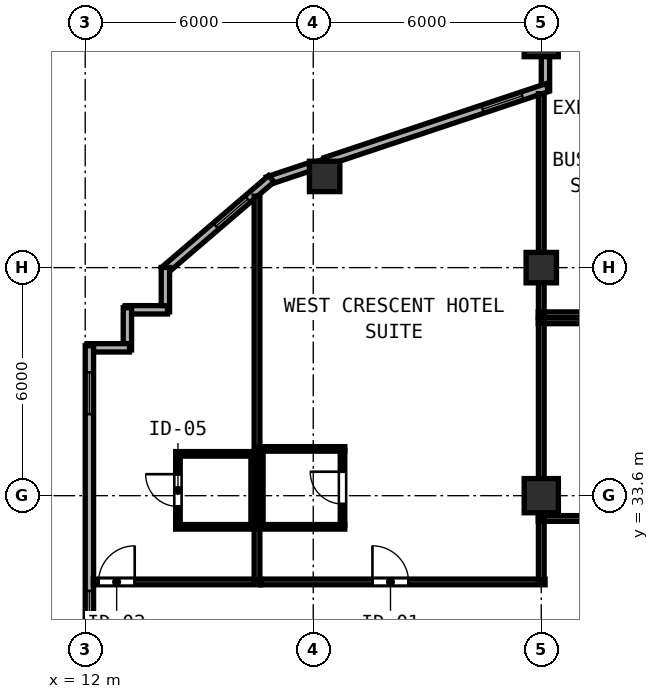
"""IFC4 building model, lengths in metres.
Left out: names, types, materials, properties, quantities, classifications, styles, units other than length and angle.
Written with IfcOpenShell. Run it as: python <this file> out.ifc"""

import sys

from ifc_helpers import new_model, si_unit, direction, frame, frame_2d, origin, origin_2d, place, context, subcontext, project, spatial, rectangle, hollow_rectangle, extrude, element, fill, save


model = new_model("IFC4")
c1 = context("Model", 3, precision=1e-05, world=origin(), true_north=direction((0.0, 1.0)))
c2 = subcontext(c1, "Body", "Model", "MODEL_VIEW")
j1 = project(units=[si_unit("LENGTHUNIT", "METRE"), si_unit("PLANEANGLEUNIT", "RADIAN")], contexts=[c1])
p1 = place(None, origin())
s1 = spatial("IfcSite", under=j1, at=p1, CompositionType="ELEMENT")
p2 = place(p1, origin())
s2 = spatial("IfcBuilding", under=s1, at=p2, CompositionType="ELEMENT")
p3 = place(p2, frame((0.0, 0.0, 199.4)))
s3 = spatial("IfcBuildingStorey", under=s2, at=p3, CompositionType="ELEMENT", Elevation=199.4)
for number, where, z_axis, x_axis in (
    (1, (24.0, 33.6, 0.0), (0.0, 0.0, 1.0), (1.0, 0.0, 0.0)),
    (2, (24.0, 45.6, 0.0), (0.0, 0.0, 1.0), (1.0, 0.0, 0.0)),
):
    element("IfcColumn", number, at=place(p3, frame(where, z_axis=z_axis, x_axis=x_axis)), inside=s3, PredefinedType="COLUMN", context=c2, shape_type="SweptSolid", body=[
        extrude(hollow_rectangle(XDim=0.9, YDim=0.9, WallThickness=0.034, at=origin_2d()), origin(), (0.0, 0.0, 1.0), 3.8),
    ])
for number, where, z_axis, x_axis in (
    (3, (24.0, 39.6, 0.0), (0.0, 0.0, 1.0), (1.0, 0.0, 0.0)),
    (4, (18.3, 42.0, 0.0), (0.0, 0.0, 1.0), (1.0, 0.0, 0.0)),
):
    element("IfcColumn", number, at=place(p3, frame(where, z_axis=z_axis, x_axis=x_axis)), inside=s3, PredefinedType="COLUMN", context=c2, shape_type="SweptSolid", body=[
        extrude(hollow_rectangle(XDim=0.8, YDim=0.8, WallThickness=0.03, at=origin_2d()), origin(), (0.0, 0.0, 1.0), 3.8),
    ])
p4 = place(p3, frame((24.11, 45.158, 0.0), z_axis=(0.0, 0.0, 1.0), x_axis=(0.0, -1.0, 0.0)))
e5 = element("IfcWall", 5, at=p4, inside=s3, PredefinedType="SOLIDWALL", context=c2, shape_type="SweptSolid", body=[
    extrude(rectangle(XDim=0.892, YDim=0.22, at=frame_2d((0.446, 0.0))), origin(), (0.0, 0.0, 1.0), 3.215),
])
p5 = place(p3, frame((24.162, 44.338, 0.0), z_axis=(0.0, 0.0, 1.0), x_axis=(-0.948687265055, -0.316215864755, 0.0)))
e6 = element("IfcWall", 6, at=p5, inside=s3, PredefinedType="SOLIDWALL", context=c2, shape_type="SweptSolid", body=[
    extrude(rectangle(XDim=6.154, YDim=0.22, at=frame_2d((3.077, 0.0))), origin(), (0.0, 0.0, 1.0), 3.215),
])
p6 = place(p5, frame((0.7, 0.0, 0.85)))
e7 = element("IfcOpeningElement", 7, at=p6, cuts=e6, PredefinedType="OPENING", context=c2, shape_type="SweptSolid", body=[
    extrude(rectangle(XDim=1.1, YDim=1.75, at=frame_2d((0.55, 0.875))), frame((0.0, 0.12, 0.0), z_axis=(0.0, -1.0, 0.0), x_axis=(1.0, 0.0, 0.0)), (0.0, 0.0, 1.0), 0.24),
])
p7 = place(p3, frame((17.908, 42.253, 0.0), z_axis=(0.0, 0.0, 1.0), x_axis=(-0.948662335685, -0.316290646166, 0.0)))
e8 = element("IfcWall", 8, at=p7, inside=s3, PredefinedType="SOLIDWALL", context=c2, shape_type="SweptSolid", body=[
    extrude(rectangle(XDim=1.165, YDim=0.22, at=frame_2d((0.583, 0.0))), origin(), (0.0, 0.0, 1.0), 3.62),
])
p8 = place(p3, frame((16.897, 41.938, 0.0), z_axis=(0.0, 0.0, 1.0), x_axis=(-0.759279729622, -0.650764390686, 0.0)))
e9 = element("IfcWall", 9, at=p8, inside=s3, PredefinedType="SOLIDWALL", context=c2, shape_type="SweptSolid", body=[
    extrude(rectangle(XDim=3.726, YDim=0.22, at=frame_2d((1.863, 0.0))), origin(), (0.0, 0.0, 1.0), 3.62),
])
p9 = place(p8, frame((0.819, 0.0, 0.85)))
e10 = element("IfcOpeningElement", 10, at=p9, cuts=e9, PredefinedType="OPENING", context=c2, shape_type="SweptSolid", body=[
    extrude(rectangle(XDim=1.1, YDim=1.75, at=frame_2d((0.55, 0.875))), frame((0.0, 0.12, 0.0), z_axis=(0.0, -1.0, 0.0), x_axis=(1.0, 0.0, 0.0)), (0.0, 0.0, 1.0), 0.24),
])
p10 = place(p3, frame((14.11, 39.604, 0.0), z_axis=(0.0, 0.0, 1.0), x_axis=(0.0, -1.0, 0.0)))
e11 = element("IfcWall", 11, at=p10, inside=s3, PredefinedType="SOLIDWALL", context=c2, shape_type="SweptSolid", body=[
    extrude(rectangle(XDim=1.169, YDim=0.22, at=frame_2d((0.585, 0.0))), origin(), (0.0, 0.0, 1.0), 3.62),
])
p11 = place(p3, frame((14.165, 38.49, 0.0), z_axis=(0.0, 0.0, 1.0), x_axis=(-1.0, 0.0, 0.0)))
e12 = element("IfcWall", 12, at=p11, inside=s3, PredefinedType="SOLIDWALL", context=c2, shape_type="SweptSolid", body=[
    extrude(rectangle(XDim=1.11, YDim=0.22, at=frame_2d((0.555, 0.0))), origin(), (0.0, 0.0, 1.0), 3.62),
])
p12 = place(p3, frame((13.11, 38.545, 0.0), z_axis=(0.0, 0.0, 1.0), x_axis=(0.0, -1.0, 0.0)))
e13 = element("IfcWall", 13, at=p12, inside=s3, PredefinedType="SOLIDWALL", context=c2, shape_type="SweptSolid", body=[
    extrude(rectangle(XDim=1.11, YDim=0.22, at=frame_2d((0.555, 0.0))), origin(), (0.0, 0.0, 1.0), 3.62),
])
p13 = place(p3, frame((13.165, 37.49, 0.0), z_axis=(0.0, 0.0, 1.0), x_axis=(-1.0, 0.0, 0.0)))
e14 = element("IfcWall", 14, at=p13, inside=s3, PredefinedType="SOLIDWALL", context=c2, shape_type="SweptSolid", body=[
    extrude(rectangle(XDim=1.11, YDim=0.22, at=frame_2d((0.555, 0.0))), origin(), (0.0, 0.0, 1.0), 3.62),
])
p14 = place(p3, frame((12.11, 37.545, 0.0), z_axis=(0.0, 0.0, 1.0), x_axis=(0.0, -1.0, 0.0)))
e15 = element("IfcWall", 15, at=p14, inside=s3, PredefinedType="SOLIDWALL", context=c2, shape_type="SweptSolid", body=[
    extrude(rectangle(XDim=21.145, YDim=0.22, at=frame_2d((10.573, 0.0))), origin(), (0.0, 0.0, 1.0), 3.62),
])
p15 = place(p14, frame((0.7, 0.0, 0.85)))
e16 = element("IfcOpeningElement", 16, at=p15, cuts=e15, PredefinedType="OPENING", context=c2, shape_type="SweptSolid", body=[
    extrude(rectangle(XDim=1.1, YDim=1.75, at=frame_2d((0.55, 0.875))), frame((0.0, 0.12, 0.0), z_axis=(0.0, -1.0, 0.0), x_axis=(1.0, 0.0, 0.0)), (0.0, 0.0, 1.0), 0.24),
])
p16 = place(p14, frame((6.45, 0.0, 0.85)))
e17 = element("IfcOpeningElement", 17, at=p16, cuts=e15, PredefinedType="OPENING", context=c2, shape_type="SweptSolid", body=[
    extrude(rectangle(XDim=1.1, YDim=1.75, at=frame_2d((0.55, 0.875))), frame((0.0, 0.12, 0.0), z_axis=(0.0, -1.0, 0.0), x_axis=(1.0, 0.0, 0.0)), (0.0, 0.0, 1.0), 0.24),
])
p17 = place(p14, frame((11.5, 0.0, 0.85)))
e18 = element("IfcOpeningElement", 18, at=p17, cuts=e15, PredefinedType="OPENING", context=c2, shape_type="SweptSolid", body=[
    extrude(rectangle(XDim=1.1, YDim=1.75, at=frame_2d((0.55, 0.875))), frame((0.0, 0.12, 0.0), z_axis=(0.0, -1.0, 0.0), x_axis=(1.0, 0.0, 0.0)), (0.0, 0.0, 1.0), 0.24),
])
p18 = place(p14, frame((16.9, 0.0, 0.85)))
e19 = element("IfcOpeningElement", 19, at=p18, cuts=e15, PredefinedType="OPENING", context=c2, shape_type="SweptSolid", body=[
    extrude(rectangle(XDim=1.1, YDim=1.75, at=frame_2d((0.55, 0.875))), frame((0.0, 0.12, 0.0), z_axis=(0.0, -1.0, 0.0), x_axis=(1.0, 0.0, 0.0)), (0.0, 0.0, 1.0), 0.24),
])
for number, where, z_axis, x_axis in (
    (20, (23.92, 38.2, 0.0), (0.0, 0.0, 1.0), (1.0, 0.0, 0.0)),
    (21, (23.92, 33.0, 0.0), (0.0, 0.0, 1.0), (1.0, 0.0, 0.0)),
):
    element("IfcWall", number, at=place(p3, frame(where, z_axis=z_axis, x_axis=x_axis)), inside=s3, PredefinedType="PARTITIONING", context=c2, shape_type="SweptSolid", body=[
        extrude(rectangle(XDim=3.8, YDim=0.15, at=frame_2d((1.9, 0.0))), origin(), (0.0, 0.0, 1.0), 3.62),
    ])
p19 = place(p3, frame((24.0, 33.06, 0.0), z_axis=(0.0, 0.0, 1.0), x_axis=(0.0, 1.0, 0.0)))
e22 = element("IfcWall", 22, at=p19, inside=s3, PredefinedType="PARTITIONING", context=c2, shape_type="SweptSolid", body=[
    extrude(rectangle(XDim=5.08, YDim=0.15, at=frame_2d((2.54, 0.0))), origin(), (0.0, 0.0, 1.0), 3.215),
])
p20 = place(p3, frame((23.92, 38.36, 0.0), z_axis=(0.0, 0.0, 1.0), x_axis=(1.0, 0.0, 0.0)))
e23 = element("IfcWall", 23, at=p20, inside=s3, PredefinedType="PARTITIONING", context=c2, shape_type="SweptSolid", body=[
    extrude(rectangle(XDim=3.8, YDim=0.15, at=frame_2d((1.9, 0.0))), origin(), (0.0, 0.0, 1.0), 3.62),
])
p21 = place(p3, frame((24.0, 38.42, 0.0), z_axis=(0.0, 0.0, 1.0), x_axis=(0.0, 1.0, 0.0)))
e24 = element("IfcWall", 24, at=p21, inside=s3, PredefinedType="PARTITIONING", context=c2, shape_type="SweptSolid", body=[
    extrude(rectangle(XDim=5.757, YDim=0.15, at=frame_2d((2.878, 0.0))), origin(), (0.0, 0.0, 1.0), 3.215),
])
p22 = place(p3, frame((12.212, 31.33, 0.0), z_axis=(0.0, 0.0, 1.0), x_axis=(1.0, 0.0, 0.0)))
e25 = element("IfcWall", 25, at=p22, inside=s3, PredefinedType="PARTITIONING", context=c2, shape_type="SweptSolid", body=[
    extrude(rectangle(XDim=4.408, YDim=0.15, at=frame_2d((2.204, 0.0))), origin(), (0.0, 0.0, 1.0), 3.62),
])
p23 = place(p22, frame((0.14, 0.0, 0.0)))
e26 = element("IfcOpeningElement", 26, at=p23, cuts=e25, PredefinedType="OPENING", context=c2, shape_type="SweptSolid", body=[
    extrude(rectangle(XDim=0.95, YDim=2.15, at=frame_2d((0.475, 1.075))), frame((0.0, 0.085, 0.0), z_axis=(0.0, -1.0, 0.0), x_axis=(1.0, 0.0, 0.0)), (0.0, 0.0, 1.0), 0.17),
])
p24 = place(p3, frame((16.52, 31.39, 0.0), z_axis=(0.0, 0.0, 1.0), x_axis=(0.0, 1.0, 0.0)))
e27 = element("IfcWall", 27, at=p24, inside=s3, PredefinedType="PARTITIONING", context=c2, shape_type="SweptSolid", body=[
    extrude(rectangle(XDim=10.091, YDim=0.15, at=frame_2d((5.045, 0.0))), origin(), (0.0, 0.0, 1.0), 3.62),
])
for number, where, z_axis, x_axis in (
    (28, (14.38, 34.7, 0.0), (0.0, 0.0, 1.0), (1.0, 0.0, 0.0)),
    (29, (14.38, 32.78, 0.0), (0.0, 0.0, 1.0), (1.0, 0.0, 0.0)),
):
    element("IfcWall", number, at=place(p3, frame(where, z_axis=z_axis, x_axis=x_axis)), inside=s3, PredefinedType="PARTITIONING", context=c2, shape_type="SweptSolid", body=[
        extrude(rectangle(XDim=2.08, YDim=0.12, at=frame_2d((1.04, 0.0))), origin(), (0.0, 0.0, 1.0), 3.62),
    ])
p25 = place(p3, frame((14.44, 32.825, 0.0), z_axis=(0.0, 0.0, 1.0), x_axis=(0.0, 1.0, 0.0)))
e30 = element("IfcWall", 30, at=p25, inside=s3, PredefinedType="PARTITIONING", context=c2, shape_type="SweptSolid", body=[
    extrude(rectangle(XDim=1.83, YDim=0.12, at=frame_2d((0.915, 0.0))), origin(), (0.0, 0.0, 1.0), 3.62),
])
p26 = place(p25, frame((1.34, 0.0, 0.0), z_axis=(0.0, 0.0, 1.0), x_axis=(-1.0, 0.0, 0.0)))
e31 = element("IfcOpeningElement", 31, at=p26, cuts=e30, PredefinedType="OPENING", context=c2, shape_type="SweptSolid", body=[
    extrude(rectangle(XDim=0.85, YDim=2.1, at=frame_2d((0.425, 1.05))), frame((0.0, 0.07, 0.0), z_axis=(0.0, -1.0, 0.0), x_axis=(1.0, 0.0, 0.0)), (0.0, 0.0, 1.0), 0.14),
])
p27 = place(p3, frame((16.42, 32.825, 0.0), z_axis=(0.0, 0.0, 1.0), x_axis=(0.0, 1.0, 0.0)))
e32 = element("IfcWall", 32, at=p27, inside=s3, PredefinedType="PARTITIONING", context=c2, shape_type="SweptSolid", body=[
    extrude(rectangle(XDim=1.83, YDim=0.12, at=frame_2d((0.915, 0.0))), origin(), (0.0, 0.0, 1.0), 3.62),
])
p28 = place(p3, frame((16.622, 31.33, 0.0), z_axis=(0.0, 0.0, 1.0), x_axis=(1.0, 0.0, 0.0)))
e33 = element("IfcWall", 33, at=p28, inside=s3, PredefinedType="PARTITIONING", context=c2, shape_type="SweptSolid", body=[
    extrude(rectangle(XDim=7.478, YDim=0.15, at=frame_2d((3.739, 0.0))), origin(), (0.0, 0.0, 1.0), 3.62),
])
p29 = place(p28, frame((2.936, 0.0, 0.0)))
e34 = element("IfcOpeningElement", 34, at=p29, cuts=e33, PredefinedType="OPENING", context=c2, shape_type="SweptSolid", body=[
    extrude(rectangle(XDim=0.95, YDim=2.18, at=frame_2d((0.475, 1.09))), frame((0.0, 0.085, 0.0), z_axis=(0.0, -1.0, 0.0), x_axis=(1.0, 0.0, 0.0)), (0.0, 0.0, 1.0), 0.17),
])
p30 = place(p3, frame((24.0, 31.39, 0.0), z_axis=(0.0, 0.0, 1.0), x_axis=(0.0, 1.0, 0.0)))
e35 = element("IfcWall", 35, at=p30, inside=s3, PredefinedType="PARTITIONING", context=c2, shape_type="SweptSolid", body=[
    extrude(rectangle(XDim=1.55, YDim=0.15, at=frame_2d((0.775, 0.0))), origin(), (0.0, 0.0, 1.0), 3.215),
])
for number, where, z_axis, x_axis in (
    (36, (16.58, 34.83, 0.0), (0.0, 0.0, 1.0), (1.0, 0.0, 0.0)),
    (37, (16.58, 32.78, 0.0), (0.0, 0.0, 1.0), (1.0, 0.0, 0.0)),
):
    element("IfcWall", number, at=place(p3, frame(where, z_axis=z_axis, x_axis=x_axis)), inside=s3, PredefinedType="PARTITIONING", context=c2, shape_type="SweptSolid", body=[
        extrude(rectangle(XDim=2.25, YDim=0.12, at=frame_2d((1.125, 0.0))), origin(), (0.0, 0.0, 1.0), 3.62),
    ])
p31 = place(p3, frame((16.62, 32.825, 0.0), z_axis=(0.0, 0.0, 1.0), x_axis=(0.0, 1.0, 0.0)))
e38 = element("IfcWall", 38, at=p31, inside=s3, PredefinedType="PARTITIONING", context=c2, shape_type="SweptSolid", body=[
    extrude(rectangle(XDim=1.96, YDim=0.12, at=frame_2d((0.98, 0.0))), origin(), (0.0, 0.0, 1.0), 3.62),
])
p32 = place(p3, frame((18.77, 32.825, 0.0), z_axis=(0.0, 0.0, 1.0), x_axis=(0.0, 1.0, 0.0)))
e39 = element("IfcWall", 39, at=p32, inside=s3, PredefinedType="PARTITIONING", context=c2, shape_type="SweptSolid", body=[
    extrude(rectangle(XDim=1.96, YDim=0.12, at=frame_2d((0.98, 0.0))), origin(), (0.0, 0.0, 1.0), 3.62),
])
p33 = place(p32, frame((0.555, 0.0, 0.0)))
e40 = element("IfcOpeningElement", 40, at=p33, cuts=e39, PredefinedType="OPENING", context=c2, shape_type="SweptSolid", body=[
    extrude(rectangle(XDim=0.85, YDim=2.1, at=frame_2d((0.425, 1.05))), frame((0.0, 0.07, 0.0), z_axis=(0.0, -1.0, 0.0), x_axis=(1.0, 0.0, 0.0)), (0.0, 0.0, 1.0), 0.14),
])
p34 = place(p6, origin())
e41 = element("IfcWindow", 41, at=p34, inside=s3, PartitioningType="SINGLE_PANEL", PredefinedType="WINDOW", context=c2, shape_type="SweptSolid", body=[
    extrude(rectangle(XDim=1.1, YDim=1.75, at=frame_2d((0.55, 0.875))), frame((0.0, 0.03, 0.0), z_axis=(0.0, -1.0, 0.0), x_axis=(1.0, 0.0, 0.0)), (0.0, 0.0, 1.0), 0.06),
])
fill(e7, e41)
p35 = place(p9, origin())
e42 = element("IfcWindow", 42, at=p35, inside=s3, PartitioningType="SINGLE_PANEL", PredefinedType="WINDOW", context=c2, shape_type="SweptSolid", body=[
    extrude(rectangle(XDim=1.1, YDim=1.75, at=frame_2d((0.55, 0.875))), frame((0.0, 0.03, 0.0), z_axis=(0.0, -1.0, 0.0), x_axis=(1.0, 0.0, 0.0)), (0.0, 0.0, 1.0), 0.06),
])
fill(e10, e42)
p36 = place(p15, origin())
e43 = element("IfcWindow", 43, at=p36, inside=s3, PartitioningType="SINGLE_PANEL", PredefinedType="WINDOW", context=c2, shape_type="SweptSolid", body=[
    extrude(rectangle(XDim=1.1, YDim=1.75, at=frame_2d((0.55, 0.875))), frame((0.0, 0.03, 0.0), z_axis=(0.0, -1.0, 0.0), x_axis=(1.0, 0.0, 0.0)), (0.0, 0.0, 1.0), 0.06),
])
fill(e16, e43)
p37 = place(p16, origin())
e44 = element("IfcWindow", 44, at=p37, inside=s3, PartitioningType="SINGLE_PANEL", PredefinedType="WINDOW", context=c2, shape_type="SweptSolid", body=[
    extrude(rectangle(XDim=1.1, YDim=1.75, at=frame_2d((0.55, 0.875))), frame((0.0, 0.03, 0.0), z_axis=(0.0, -1.0, 0.0), x_axis=(1.0, 0.0, 0.0)), (0.0, 0.0, 1.0), 0.06),
])
fill(e17, e44)
p38 = place(p23, origin())
e45 = element("IfcDoor", 45, at=p38, inside=s3, OperationType="SINGLE_SWING_RIGHT", PredefinedType="DOOR", context=c2, shape_type="SweptSolid", body=[
    extrude(rectangle(XDim=0.95, YDim=2.15, at=frame_2d((0.475, 1.075))), frame((0.0, 0.025, 0.0), z_axis=(0.0, -1.0, 0.0), x_axis=(1.0, 0.0, 0.0)), (0.0, 0.0, 1.0), 0.05),
])
fill(e26, e45)
p39 = place(p26, origin())
e46 = element("IfcDoor", 46, at=p39, inside=s3, OperationType="SINGLE_SWING_LEFT", PredefinedType="DOOR", context=c2, shape_type="SweptSolid", body=[
    extrude(rectangle(XDim=0.85, YDim=2.1, at=frame_2d((0.425, 1.05))), frame((0.0, 0.025, 0.0), z_axis=(0.0, -1.0, 0.0), x_axis=(1.0, 0.0, 0.0)), (0.0, 0.0, 1.0), 0.05),
])
fill(e31, e46)
p40 = place(p29, origin())
e47 = element("IfcDoor", 47, at=p40, inside=s3, OperationType="SINGLE_SWING_LEFT", PredefinedType="DOOR", context=c2, shape_type="SweptSolid", body=[
    extrude(rectangle(XDim=0.95, YDim=2.18, at=frame_2d((0.475, 1.09))), frame((0.0, 0.025, 0.0), z_axis=(0.0, -1.0, 0.0), x_axis=(1.0, 0.0, 0.0)), (0.0, 0.0, 1.0), 0.05),
])
fill(e34, e47)
p41 = place(p33, origin())
e48 = element("IfcDoor", 48, at=p41, inside=s3, OperationType="SINGLE_SWING_RIGHT", PredefinedType="DOOR", context=c2, shape_type="SweptSolid", body=[
    extrude(rectangle(XDim=0.85, YDim=2.1, at=frame_2d((0.425, 1.05))), frame((0.0, 0.025, 0.0), z_axis=(0.0, -1.0, 0.0), x_axis=(1.0, 0.0, 0.0)), (0.0, 0.0, 1.0), 0.05),
])
fill(e40, e48)
save(model, sys.argv[1])
